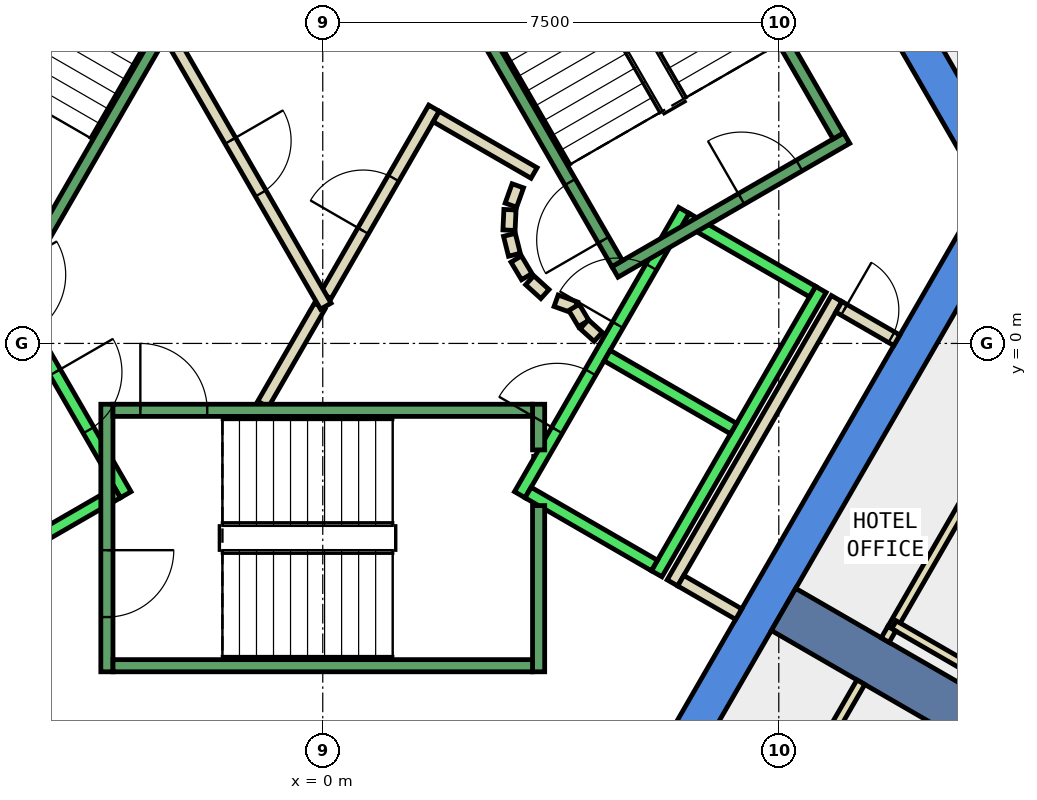
"""IFC4 building model, lengths in metres.
Left out: names, types, materials, properties, quantities, classifications, styles, units other than length and angle.
Written with IfcOpenShell. Run it as: python <this file> out.ifc"""

import sys

from ifc_helpers import new_model, si_unit, direction, frame, frame_2d, origin, place, context, subcontext, project, spatial, polyline, rectangle, outline, extrude, element, fill, save


model = new_model("IFC4")
c1 = context("Model", 3, precision=1e-05, world=origin(), true_north=direction((0.0, 1.0)))
c2 = subcontext(c1, "Body", "Model", "MODEL_VIEW")
j1 = project(units=[si_unit("LENGTHUNIT", "METRE"), si_unit("PLANEANGLEUNIT", "RADIAN")], contexts=[c1])
p1 = place(None, origin())
s1 = spatial("IfcSite", under=j1, at=p1, CompositionType="ELEMENT")
p2 = place(p1, origin())
s2 = spatial("IfcBuilding", under=s1, at=p2, CompositionType="ELEMENT")
p3 = place(p2, frame((0.0, 0.0, 248.6)))
s3 = spatial("IfcBuildingStorey", under=s2, at=p3, CompositionType="ELEMENT", Elevation=248.6)
p4 = place(p3, frame((0.0, 0.0, -0.34)))
e1 = element("IfcWall", 1, at=p4, inside=s3, PredefinedType="SHEAR", context=c2, shape_type="SweptSolid", body=[
    extrude(outline(polyline([(6.786, 10.747), (6.266, 10.447), (10.854, 2.5), (11.547, 2.5), (6.786, 10.747)])), origin(), (0.0, 0.0, 1.0), 3.6),
])
p5 = place(p3, frame((0.0, 0.0, -0.34)))
e2 = element("IfcWall", 2, at=p5, inside=s3, PredefinedType="SHEAR", context=c2, shape_type="SweptSolid", body=[
    extrude(outline(polyline([(5.774, -7.5), (11.547, 2.5), (10.854, 2.5), (5.427, -6.9), (5.774, -7.5)])), origin(), (0.0, 0.0, 1.0), 3.6),
])
p6 = place(p3, frame((7.578, -4.375, -0.34), z_axis=(0.0, 0.0, 1.0), x_axis=(0.866024315419, -0.5000018851, 0.0)))
e3 = element("IfcWall", 3, at=p6, inside=s3, PredefinedType="SHEAR", context=c2, shape_type="SweptSolid", body=[
    extrude(rectangle(XDim=9.0, YDim=0.8, at=frame_2d((4.5, 0.0))), origin(), (0.0, 0.0, 1.0), 3.6),
])
p7 = place(p3, frame((5.751, -3.938, 0.0), z_axis=(0.0, 0.0, 1.0), x_axis=(0.500034260056, 0.866005622828, 0.0)))
e4 = element("IfcWall", 4, at=p7, inside=s3, PredefinedType="PARTITIONING", context=c2, shape_type="SweptSolid", body=[
    extrude(rectangle(XDim=5.399, YDim=0.2, at=frame_2d((2.7, 0.0))), origin(), (0.0, 0.0, 1.0), 3.26),
])
p8 = place(p3, frame((8.488, 0.602, 0.0), z_axis=(0.0, 0.0, 1.0), x_axis=(0.866063652425, -0.499933745558, 0.0)))
e5 = element("IfcWall", 5, at=p8, inside=s3, PredefinedType="PARTITIONING", context=c2, shape_type="SweptSolid", body=[
    extrude(rectangle(XDim=1.1, YDim=0.2, at=frame_2d((0.55, 0.0))), origin(), (0.0, 0.0, 1.0), 3.26),
])
p9 = place(p8, frame((0.1, 0.0, 0.0)))
e6 = element("IfcOpeningElement", 6, at=p9, cuts=e5, PredefinedType="OPENING", context=c2, shape_type="SweptSolid", body=[
    extrude(rectangle(XDim=0.9, YDim=2.1, at=frame_2d((0.45, 1.05))), frame((0.0, 0.11, 0.0), z_axis=(0.0, -1.0, 0.0), x_axis=(1.0, 0.0, 0.0)), (0.0, 0.0, 1.0), 0.22),
])
p10 = place(p3, frame((6.841, -4.452, 0.0), z_axis=(0.0, 0.0, 1.0), x_axis=(-0.86621513555, 0.499671230855, 0.0)))
e7 = element("IfcWall", 7, at=p10, inside=s3, PredefinedType="PARTITIONING", context=c2, shape_type="SweptSolid", body=[
    extrude(rectangle(XDim=1.1, YDim=0.2, at=frame_2d((0.55, 0.0))), origin(), (0.0, 0.0, 1.0), 3.26),
])
p11 = place(p3, frame((7.8, -7.39, 0.0), z_axis=(0.0, 0.0, 1.0), x_axis=(0.499977374825, 0.866038466041, 0.0)))
e8 = element("IfcWall", 8, at=p11, inside=s3, PredefinedType="PARTITIONING", context=c2, shape_type="SweptSolid", body=[
    extrude(rectangle(XDim=2.1, YDim=0.15, at=frame_2d((1.05, 0.0))), origin(), (0.0, 0.0, 1.0), 3.26),
])
p12 = place(p3, frame((9.358, -4.692, 0.0), z_axis=(0.0, 0.0, 1.0), x_axis=(0.500027777314, 0.866009365951, 0.0)))
e9 = element("IfcWall", 9, at=p12, inside=s3, PredefinedType="PARTITIONING", context=c2, shape_type="SweptSolid", body=[
    extrude(rectangle(XDim=7.36, YDim=0.15, at=frame_2d((3.68, 0.0))), origin(), (0.0, 0.0, 1.0), 3.26),
])
p13 = place(p3, frame((-0.982, -1.0, 0.0), z_axis=(0.0, 0.0, 1.0), x_axis=(0.50024047865, 0.865886518847, 0.0)))
e10 = element("IfcWall", 10, at=p13, inside=s3, PredefinedType="PARTITIONING", context=c2, shape_type="SweptSolid", body=[
    extrude(rectangle(XDim=1.863, YDim=0.2, at=frame_2d((0.931, 0.0))), origin(), (0.0, 0.0, 1.0), 3.26),
])
p14 = place(p3, frame((0.05, 0.787, 0.0), z_axis=(0.0, 0.0, 1.0), x_axis=(0.499954076797, 0.866051915934, 0.0)))
e11 = element("IfcWall", 11, at=p14, inside=s3, PredefinedType="PARTITIONING", context=c2, shape_type="SweptSolid", body=[
    extrude(rectangle(XDim=3.558, YDim=0.2, at=frame_2d((1.779, 0.0))), origin(), (0.0, 0.0, 1.0), 3.26),
])
p15 = place(p14, frame((1.229, 0.0, 0.0)))
e12 = element("IfcOpeningElement", 12, at=p15, cuts=e11, PredefinedType="OPENING", context=c2, shape_type="SweptSolid", body=[
    extrude(rectangle(XDim=1.0, YDim=2.1, at=frame_2d((0.5, 1.05))), frame((0.0, 0.11, 0.0), z_axis=(0.0, -1.0, 0.0), x_axis=(1.0, 0.0, 0.0)), (0.0, 0.0, 1.0), 0.22),
])
p16 = place(p3, frame((1.866, 3.732, 0.0), z_axis=(0.0, 0.0, 1.0), x_axis=(0.866043361281, -0.499968895414, 0.0)))
e13 = element("IfcWall", 13, at=p16, inside=s3, PredefinedType="PARTITIONING", context=c2, shape_type="SweptSolid", body=[
    extrude(rectangle(XDim=1.858, YDim=0.2, at=frame_2d((0.929, 0.0))), origin(), (0.0, 0.0, 1.0), 3.26),
])
p17 = place(p3, frame((3.208, 2.592, 0.0), z_axis=(0.0, 0.0, 1.0), x_axis=(-0.337388820924, -0.941365382578, 0.0)))
e14 = element("IfcWall", 14, at=p17, inside=s3, PredefinedType="PARTITIONING", context=c2, shape_type="SweptSolid", body=[
    extrude(rectangle(XDim=0.338, YDim=0.2, at=frame_2d((0.169, 0.0))), origin(), (0.0, 0.0, 1.0), 3.26),
])
p18 = place(p3, frame((3.079, 2.199, 0.0), z_axis=(0.0, 0.0, 1.0), x_axis=(-0.047771483479, -0.998858290933, 0.0)))
e15 = element("IfcWall", 15, at=p18, inside=s3, PredefinedType="PARTITIONING", context=c2, shape_type="SweptSolid", body=[
    extrude(rectangle(XDim=0.337, YDim=0.2, at=frame_2d((0.169, 0.0))), origin(), (0.0, 0.0, 1.0), 3.26),
])
p19 = place(p3, frame((3.07, 1.786, 0.0), z_axis=(0.0, 0.0, 1.0), x_axis=(0.242705583207, -0.970099994784, 0.0)))
e16 = element("IfcWall", 16, at=p19, inside=s3, PredefinedType="PARTITIONING", context=c2, shape_type="SweptSolid", body=[
    extrude(rectangle(XDim=0.338, YDim=0.2, at=frame_2d((0.169, 0.0))), origin(), (0.0, 0.0, 1.0), 3.26),
])
for number, where, z_axis, x_axis in (
    (17, (3.182, 1.388, 0.0), (0.0, 0.0, 1.0), (0.512, -0.859, 0.0)),
    (18, (3.404, 1.039, 0.0), (0.0, 0.0, 1.0), (0.74, -0.672, 0.0)),
):
    element("IfcWall", number, at=place(p3, frame(where, z_axis=z_axis, x_axis=x_axis)), inside=s3, PredefinedType="PARTITIONING", context=c2, shape_type="SweptSolid", body=[
        extrude(rectangle(XDim=0.338, YDim=0.2, at=frame_2d((0.169, 0.0))), origin(), (0.0, 0.0, 1.0), 3.26),
    ])
p20 = place(p3, frame((3.838, 0.702, 0.0), z_axis=(0.0, 0.0, 1.0), x_axis=(0.941035081519, -0.338308993895, 0.0)))
e19 = element("IfcWall", 19, at=p20, inside=s3, PredefinedType="PARTITIONING", context=c2, shape_type="SweptSolid", body=[
    extrude(rectangle(XDim=0.337, YDim=0.2, at=frame_2d((0.168, 0.0))), origin(), (0.0, 0.0, 1.0), 3.26),
])
p21 = place(p3, frame((4.132, 0.593, 0.0), z_axis=(0.0, 0.0, 1.0), x_axis=(0.513561617048, -0.858052717201, 0.0)))
e20 = element("IfcWall", 20, at=p21, inside=s3, PredefinedType="PARTITIONING", context=c2, shape_type="SweptSolid", body=[
    extrude(rectangle(XDim=0.308, YDim=0.2, at=frame_2d((0.154, 0.0))), origin(), (0.0, 0.0, 1.0), 3.26),
])
p22 = place(p3, frame((4.301, 0.315, 0.0), z_axis=(0.0, 0.0, 1.0), x_axis=(0.741798017506, -0.670623367639, 0.0)))
e21 = element("IfcWall", 21, at=p22, inside=s3, PredefinedType="PARTITIONING", context=c2, shape_type="SweptSolid", body=[
    extrude(rectangle(XDim=0.309, YDim=0.2, at=frame_2d((0.154, 0.0))), origin(), (0.0, 0.0, 1.0), 3.26),
])
p23 = place(p3, frame((-2.54, 5.1, 0.0), z_axis=(0.0, 0.0, 1.0), x_axis=(0.499925051871, -0.866068670783, 0.0)))
e22 = element("IfcWall", 22, at=p23, inside=s3, PredefinedType="PARTITIONING", context=c2, shape_type="SweptSolid", body=[
    extrude(rectangle(XDim=5.181, YDim=0.2, at=frame_2d((2.59, 0.0))), origin(), (0.0, 0.0, 1.0), 3.26),
])
p24 = place(p23, frame((2.04, 0.0, 0.0)))
e23 = element("IfcOpeningElement", 23, at=p24, cuts=e22, PredefinedType="OPENING", context=c2, shape_type="SweptSolid", body=[
    extrude(rectangle(XDim=1.0, YDim=2.1, at=frame_2d((0.5, 1.05))), frame((0.0, 0.11, 0.0), z_axis=(0.0, -1.0, 0.0), x_axis=(1.0, 0.0, 0.0)), (0.0, 0.0, 1.0), 0.22),
])
p25 = place(p3, frame((9.395, -4.627, 0.0), z_axis=(0.0, 0.0, 1.0), x_axis=(0.866034131428, -0.499984882974, 0.0)))
e24 = element("IfcWall", 24, at=p25, inside=s3, PredefinedType="PARTITIONING", context=c2, shape_type="SweptSolid", body=[
    extrude(rectangle(XDim=5.1, YDim=0.15, at=frame_2d((2.55, 0.0))), origin(), (0.0, 0.0, 1.0), 3.26),
])
p26 = place(p3, frame((9.25, -4.879, 0.0), z_axis=(0.0, 0.0, 1.0), x_axis=(0.499787711288, 0.866147934042, 0.0)))
e25 = element("IfcWall", 25, at=p26, inside=s3, PredefinedType="PARTITIONING", context=c2, shape_type="SweptSolid", body=[
    extrude(rectangle(XDim=0.216, YDim=0.15, at=frame_2d((0.108, 0.0))), origin(), (0.0, 0.0, 1.0), 3.26),
])
p27 = place(p3, frame((-5.94, 2.188, 0.0), z_axis=(0.0, 0.0, 1.0), x_axis=(0.500034260056, -0.866005622828, 0.0)))
e26 = element("IfcWall", 26, at=p27, inside=s3, PredefinedType="STANDARD", context=c2, shape_type="SweptSolid", body=[
    extrude(rectangle(XDim=5.399, YDim=0.2, at=frame_2d((2.7, 0.0))), origin(), (0.0, 0.0, 1.0), 3.26),
])
p28 = place(p27, frame((3.075, 0.0, 0.0)))
e27 = element("IfcOpeningElement", 27, at=p28, cuts=e26, PredefinedType="OPENING", context=c2, shape_type="SweptSolid", body=[
    extrude(rectangle(XDim=1.1, YDim=2.1, at=frame_2d((0.55, 1.05))), frame((0.0, 0.11, 0.0), z_axis=(0.0, -1.0, 0.0), x_axis=(1.0, 0.0, 0.0)), (0.0, 0.0, 1.0), 0.22),
])
p29 = place(p27, frame((1.225, 0.0, 0.0)))
e28 = element("IfcOpeningElement", 28, at=p29, cuts=e26, PredefinedType="OPENING", context=c2, shape_type="SweptSolid", body=[
    extrude(rectangle(XDim=1.1, YDim=2.1, at=frame_2d((0.55, 1.05))), frame((0.0, 0.11, 0.0), z_axis=(0.0, -1.0, 0.0), x_axis=(1.0, 0.0, 0.0)), (0.0, 0.0, 1.0), 0.22),
])
p30 = place(p3, frame((-3.377, -2.452, 0.0), z_axis=(0.0, 0.0, 1.0), x_axis=(-0.865955154139, -0.50012165622, 0.0)))
e29 = element("IfcWall", 29, at=p30, inside=s3, PredefinedType="STANDARD", context=c2, shape_type="SweptSolid", body=[
    extrude(rectangle(XDim=2.4, YDim=0.2, at=frame_2d((1.2, 0.0))), origin(), (0.0, 0.0, 1.0), 3.26),
])
p31 = place(p3, frame((3.24, -2.488, 0.0), z_axis=(0.0, 0.0, 1.0), x_axis=(0.500034260056, 0.866005622828, 0.0)))
e30 = element("IfcWall", 30, at=p31, inside=s3, PredefinedType="STANDARD", context=c2, shape_type="SweptSolid", body=[
    extrude(rectangle(XDim=5.399, YDim=0.2, at=frame_2d((2.7, 0.0))), origin(), (0.0, 0.0, 1.0), 3.26),
])
p32 = place(p31, frame((3.225, 0.0, 0.0)))
e31 = element("IfcOpeningElement", 31, at=p32, cuts=e30, PredefinedType="OPENING", context=c2, shape_type="SweptSolid", body=[
    extrude(rectangle(XDim=1.1, YDim=2.1, at=frame_2d((0.55, 1.05))), frame((0.0, 0.11, 0.0), z_axis=(0.0, -1.0, 0.0), x_axis=(1.0, 0.0, 0.0)), (0.0, 0.0, 1.0), 0.22),
])
p33 = place(p31, frame((1.225, 0.0, 0.0)))
e32 = element("IfcOpeningElement", 32, at=p33, cuts=e30, PredefinedType="OPENING", context=c2, shape_type="SweptSolid", body=[
    extrude(rectangle(XDim=1.1, YDim=2.1, at=frame_2d((0.55, 1.05))), frame((0.0, 0.11, 0.0), z_axis=(0.0, -1.0, 0.0), x_axis=(1.0, 0.0, 0.0)), (0.0, 0.0, 1.0), 0.22),
])
p34 = place(p3, frame((5.492, -3.788, 0.0), z_axis=(0.0, 0.0, 1.0), x_axis=(0.500034260056, 0.866005622828, 0.0)))
e33 = element("IfcWall", 33, at=p34, inside=s3, PredefinedType="STANDARD", context=c2, shape_type="SweptSolid", body=[
    extrude(rectangle(XDim=5.399, YDim=0.2, at=frame_2d((2.7, 0.0))), origin(), (0.0, 0.0, 1.0), 3.26),
])
p35 = place(p3, frame((3.377, -2.452, 0.0), z_axis=(0.0, 0.0, 1.0), x_axis=(0.865955154139, -0.50012165622, 0.0)))
e34 = element("IfcWall", 34, at=p35, inside=s3, PredefinedType="STANDARD", context=c2, shape_type="SweptSolid", body=[
    extrude(rectangle(XDim=2.4, YDim=0.2, at=frame_2d((1.2, 0.0))), origin(), (0.0, 0.0, 1.0), 3.26),
])
for number, where, z_axis, x_axis in (
    (35, (4.677, -0.2, 0.0), (0.0, 0.0, 1.0), (0.866, -0.5, 0.0)),
    (36, (5.977, 2.052, 0.0), (0.0, 0.0, 1.0), (0.866, -0.5, 0.0)),
):
    element("IfcWall", number, at=place(p3, frame(where, z_axis=z_axis, x_axis=x_axis)), inside=s3, PredefinedType="STANDARD", context=c2, shape_type="SweptSolid", body=[
        extrude(rectangle(XDim=2.399, YDim=0.2, at=frame_2d((1.2, 0.0))), origin(), (0.0, 0.0, 1.0), 3.26),
    ])
p36 = place(p3, frame((-3.55, -1.0, 0.0), z_axis=(0.0, 0.0, 1.0), x_axis=(0.0, -1.0, 0.0)))
e37 = element("IfcWall", 37, at=p36, inside=s3, PredefinedType="STANDARD", context=c2, shape_type="SweptSolid", body=[
    extrude(rectangle(XDim=4.4, YDim=0.2, at=frame_2d((2.2, 0.0))), origin(), (0.0, 0.0, 1.0), 3.26),
])
p37 = place(p36, frame((2.4, 0.0, 0.0)))
e38 = element("IfcOpeningElement", 38, at=p37, cuts=e37, PredefinedType="OPENING", context=c2, shape_type="SweptSolid", body=[
    extrude(rectangle(XDim=1.1, YDim=2.2, at=frame_2d((0.55, 1.1))), frame((0.0, 0.11, 0.0), z_axis=(0.0, -1.0, 0.0), x_axis=(1.0, 0.0, 0.0)), (0.0, 0.0, 1.0), 0.22),
])
p38 = place(p3, frame((3.55, -2.667, 0.0), z_axis=(0.0, 0.0, 1.0), x_axis=(0.0, -1.0, 0.0)))
e39 = element("IfcWall", 39, at=p38, inside=s3, PredefinedType="STANDARD", context=c2, shape_type="SweptSolid", body=[
    extrude(rectangle(XDim=2.733, YDim=0.2, at=frame_2d((1.366, 0.0))), origin(), (0.0, 0.0, 1.0), 3.26),
])
p39 = place(p3, frame((3.55, -1.0, 0.0), z_axis=(0.0, 0.0, 1.0), x_axis=(0.0, -1.0, 0.0)))
e40 = element("IfcWall", 40, at=p39, inside=s3, PredefinedType="STANDARD", context=c2, shape_type="SweptSolid", body=[
    extrude(rectangle(XDim=0.751, YDim=0.2, at=frame_2d((0.375, 0.0))), origin(), (0.0, 0.0, 1.0), 3.26),
])
p40 = place(p3, frame((-3.45, -1.1, 0.0), z_axis=(0.0, 0.0, 1.0), x_axis=(1.0, 0.0, 0.0)))
e41 = element("IfcWall", 41, at=p40, inside=s3, PredefinedType="STANDARD", context=c2, shape_type="SweptSolid", body=[
    extrude(rectangle(XDim=6.9, YDim=0.2, at=frame_2d((3.45, 0.0))), origin(), (0.0, 0.0, 1.0), 3.26),
])
p41 = place(p40, frame((0.45, 0.0, 0.0)))
e42 = element("IfcOpeningElement", 42, at=p41, cuts=e41, PredefinedType="OPENING", context=c2, shape_type="SweptSolid", body=[
    extrude(rectangle(XDim=1.1, YDim=2.2, at=frame_2d((0.55, 1.1))), frame((0.0, 0.11, 0.0), z_axis=(0.0, -1.0, 0.0), x_axis=(1.0, 0.0, 0.0)), (0.0, 0.0, 1.0), 0.22),
])
p42 = place(p3, frame((-3.45, -5.3, 0.0), z_axis=(0.0, 0.0, 1.0), x_axis=(1.0, 0.0, 0.0)))
e43 = element("IfcWall", 43, at=p42, inside=s3, PredefinedType="STANDARD", context=c2, shape_type="SweptSolid", body=[
    extrude(rectangle(XDim=6.9, YDim=0.2, at=frame_2d((3.45, 0.0))), origin(), (0.0, 0.0, 1.0), 3.26),
])
p43 = place(p3, frame((4.806, 1.176, 0.0), z_axis=(0.0, 0.0, 1.0), x_axis=(0.866059941101, 0.499940174841, 0.0)))
e44 = element("IfcWall", 44, at=p43, inside=s3, PredefinedType="STANDARD", context=c2, shape_type="SweptSolid", body=[
    extrude(rectangle(XDim=4.4, YDim=0.2, at=frame_2d((2.2, 0.0))), origin(), (0.0, 0.0, 1.0), 3.26),
])
p44 = place(p43, frame((2.4, 0.0, 0.0)))
e45 = element("IfcOpeningElement", 45, at=p44, cuts=e44, PredefinedType="OPENING", context=c2, shape_type="SweptSolid", body=[
    extrude(rectangle(XDim=1.1, YDim=2.2, at=frame_2d((0.55, 1.1))), frame((0.0, 0.11, 0.0), z_axis=(0.0, -1.0, 0.0), x_axis=(1.0, 0.0, 0.0)), (0.0, 0.0, 1.0), 0.22),
])
p45 = place(p3, frame((4.843, 1.312, 0.0), z_axis=(0.0, 0.0, 1.0), x_axis=(-0.499963383562, 0.866046543262, 0.0)))
e46 = element("IfcWall", 46, at=p45, inside=s3, PredefinedType="STANDARD", context=c2, shape_type="SweptSolid", body=[
    extrude(rectangle(XDim=6.9, YDim=0.2, at=frame_2d((3.45, 0.0))), origin(), (0.0, 0.0, 1.0), 3.26),
])
p46 = place(p45, frame((0.45, 0.0, 0.0)))
e47 = element("IfcOpeningElement", 47, at=p46, cuts=e46, PredefinedType="OPENING", context=c2, shape_type="SweptSolid", body=[
    extrude(rectangle(XDim=1.1, YDim=2.2, at=frame_2d((0.55, 1.1))), frame((0.0, 0.11, 0.0), z_axis=(0.0, -1.0, 0.0), x_axis=(1.0, 0.0, 0.0)), (0.0, 0.0, 1.0), 0.22),
])
p47 = place(p3, frame((8.48, 3.412, 0.0), z_axis=(0.0, 0.0, 1.0), x_axis=(-0.499978703459, 0.866037698999, 0.0)))
e48 = element("IfcWall", 48, at=p47, inside=s3, PredefinedType="STANDARD", context=c2, shape_type="SweptSolid", body=[
    extrude(rectangle(XDim=6.9, YDim=0.2, at=frame_2d((3.45, 0.0))), origin(), (0.0, 0.0, 1.0), 3.26),
])
p48 = place(p3, frame((-1.393, 7.288, 0.0), z_axis=(0.0, 0.0, 1.0), x_axis=(-0.499963383562, -0.866046543262, 0.0)))
e49 = element("IfcWall", 49, at=p48, inside=s3, PredefinedType="STANDARD", context=c2, shape_type="SweptSolid", body=[
    extrude(rectangle(XDim=6.9, YDim=0.2, at=frame_2d((3.45, 0.0))), origin(), (0.0, 0.0, 1.0), 3.26),
])
p49 = place(p48, frame((0.45, 0.0, 0.0)))
e50 = element("IfcOpeningElement", 50, at=p49, cuts=e49, PredefinedType="OPENING", context=c2, shape_type="SweptSolid", body=[
    extrude(rectangle(XDim=1.1, YDim=2.2, at=frame_2d((0.55, 1.1))), frame((0.0, 0.11, 0.0), z_axis=(0.0, -1.0, 0.0), x_axis=(1.0, 0.0, 0.0)), (0.0, 0.0, 1.0), 0.22),
])
p50 = place(p15, origin())
e51 = element("IfcDoor", 51, at=p50, inside=s3, OperationType="SINGLE_SWING_RIGHT", PredefinedType="DOOR", context=c2, shape_type="SweptSolid", body=[
    extrude(rectangle(XDim=1.0, YDim=2.1, at=frame_2d((0.5, 1.05))), frame((0.0, 0.025, 0.0), z_axis=(0.0, -1.0, 0.0), x_axis=(1.0, 0.0, 0.0)), (0.0, 0.0, 1.0), 0.05),
])
fill(e12, e51)
p51 = place(p24, origin())
e52 = element("IfcDoor", 52, at=p51, inside=s3, OperationType="SINGLE_SWING_RIGHT", PredefinedType="DOOR", context=c2, shape_type="SweptSolid", body=[
    extrude(rectangle(XDim=1.0, YDim=2.1, at=frame_2d((0.5, 1.05))), frame((0.0, 0.025, 0.0), z_axis=(0.0, -1.0, 0.0), x_axis=(1.0, 0.0, 0.0)), (0.0, 0.0, 1.0), 0.05),
])
fill(e23, e52)
p52 = place(p9, origin())
e53 = element("IfcDoor", 53, at=p52, inside=s3, OperationType="SINGLE_SWING_RIGHT", PredefinedType="DOOR", context=c2, shape_type="SweptSolid", body=[
    extrude(rectangle(XDim=0.9, YDim=2.1, at=frame_2d((0.45, 1.05))), frame((0.0, 0.025, 0.0), z_axis=(0.0, -1.0, 0.0), x_axis=(1.0, 0.0, 0.0)), (0.0, 0.0, 1.0), 0.05),
])
fill(e6, e53)
p53 = place(p32, origin())
e54 = element("IfcDoor", 54, at=p53, inside=s3, OperationType="SLIDING_TO_LEFT", PredefinedType="DOOR", context=c2, shape_type="SweptSolid", body=[
    extrude(rectangle(XDim=1.1, YDim=2.1, at=frame_2d((0.55, 1.05))), frame((0.0, 0.025, 0.0), z_axis=(0.0, -1.0, 0.0), x_axis=(1.0, 0.0, 0.0)), (0.0, 0.0, 1.0), 0.05),
])
fill(e31, e54)
p54 = place(p28, origin())
e55 = element("IfcDoor", 55, at=p54, inside=s3, OperationType="SLIDING_TO_LEFT", PredefinedType="DOOR", context=c2, shape_type="SweptSolid", body=[
    extrude(rectangle(XDim=1.1, YDim=2.1, at=frame_2d((0.55, 1.05))), frame((0.0, 0.025, 0.0), z_axis=(0.0, -1.0, 0.0), x_axis=(1.0, 0.0, 0.0)), (0.0, 0.0, 1.0), 0.05),
])
fill(e27, e55)
p55 = place(p33, origin())
e56 = element("IfcDoor", 56, at=p55, inside=s3, OperationType="SLIDING_TO_LEFT", PredefinedType="DOOR", context=c2, shape_type="SweptSolid", body=[
    extrude(rectangle(XDim=1.1, YDim=2.1, at=frame_2d((0.55, 1.05))), frame((0.0, 0.025, 0.0), z_axis=(0.0, -1.0, 0.0), x_axis=(1.0, 0.0, 0.0)), (0.0, 0.0, 1.0), 0.05),
])
fill(e32, e56)
p56 = place(p41, origin())
e57 = element("IfcDoor", 57, at=p56, inside=s3, OperationType="SINGLE_SWING_LEFT", PredefinedType="DOOR", context=c2, shape_type="SweptSolid", body=[
    extrude(rectangle(XDim=1.1, YDim=2.2, at=frame_2d((0.55, 1.1))), frame((0.0, 0.025, 0.0), z_axis=(0.0, -1.0, 0.0), x_axis=(1.0, 0.0, 0.0)), (0.0, 0.0, 1.0), 0.05),
])
fill(e42, e57)
p57 = place(p37, origin())
e58 = element("IfcDoor", 58, at=p57, inside=s3, OperationType="SINGLE_SWING_LEFT", PredefinedType="DOOR", context=c2, shape_type="SweptSolid", body=[
    extrude(rectangle(XDim=1.1, YDim=2.2, at=frame_2d((0.55, 1.1))), frame((0.0, 0.025, 0.0), z_axis=(0.0, -1.0, 0.0), x_axis=(1.0, 0.0, 0.0)), (0.0, 0.0, 1.0), 0.05),
])
fill(e38, e58)
p58 = place(p46, origin())
e59 = element("IfcDoor", 59, at=p58, inside=s3, OperationType="SINGLE_SWING_LEFT", PredefinedType="DOOR", context=c2, shape_type="SweptSolid", body=[
    extrude(rectangle(XDim=1.1, YDim=2.2, at=frame_2d((0.55, 1.1))), frame((0.0, 0.025, 0.0), z_axis=(0.0, -1.0, 0.0), x_axis=(1.0, 0.0, 0.0)), (0.0, 0.0, 1.0), 0.05),
])
fill(e47, e59)
p59 = place(p44, origin())
e60 = element("IfcDoor", 60, at=p59, inside=s3, OperationType="SINGLE_SWING_LEFT", PredefinedType="DOOR", context=c2, shape_type="SweptSolid", body=[
    extrude(rectangle(XDim=1.1, YDim=2.2, at=frame_2d((0.55, 1.1))), frame((0.0, 0.025, 0.0), z_axis=(0.0, -1.0, 0.0), x_axis=(1.0, 0.0, 0.0)), (0.0, 0.0, 1.0), 0.05),
])
fill(e45, e60)
save(model, sys.argv[1])
